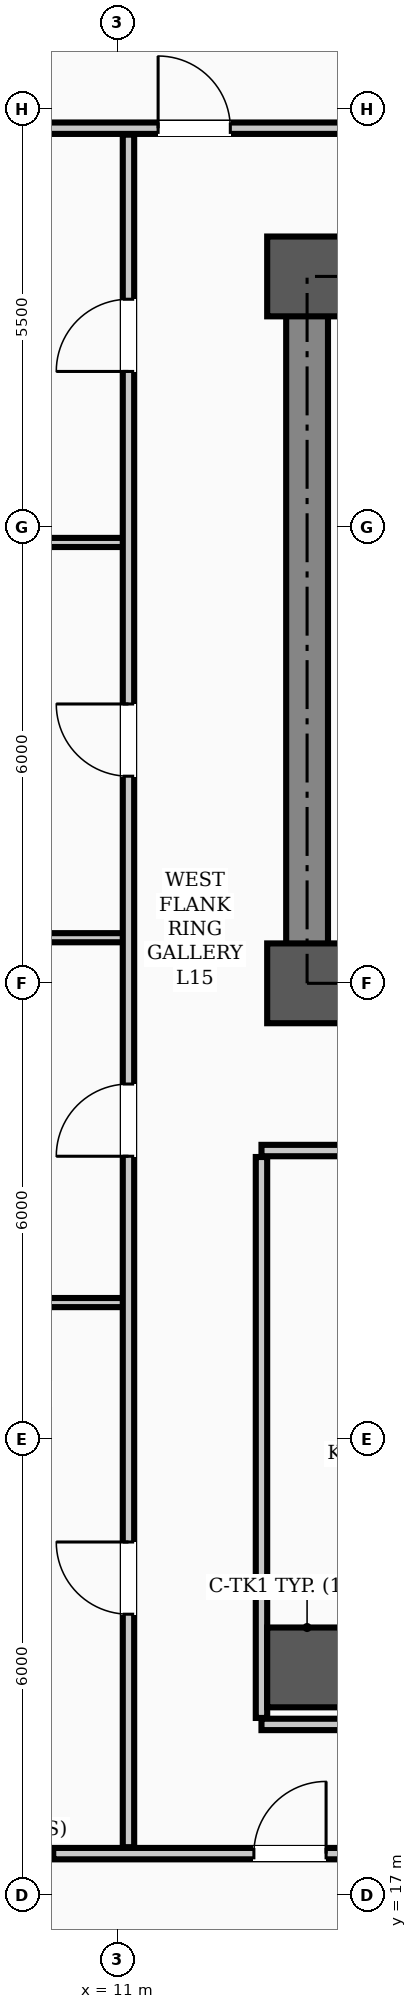
"""IFC4 building model, lengths in metres.
Left out: names, types, materials, properties, quantities, classifications, styles, units other than length and angle.
Written with IfcOpenShell. Run it as: python <this file> out.ifc"""

import sys

from ifc_helpers import new_model, si_unit, direction, frame, frame_2d, origin, origin_2d, place, context, subcontext, project, spatial, rectangle, hollow_rectangle, extrude, element, fill, save


model = new_model("IFC4")
c1 = context("Model", 3, precision=1e-05, world=origin(), true_north=direction((0.0, 1.0)))
c2 = subcontext(c1, "Body", "Model", "MODEL_VIEW")
j1 = project(units=[si_unit("LENGTHUNIT", "METRE"), si_unit("PLANEANGLEUNIT", "RADIAN")], contexts=[c1])
p1 = place(None, origin())
s1 = spatial("IfcSite", under=j1, at=p1, CompositionType="ELEMENT")
p2 = place(p1, origin())
s2 = spatial("IfcBuilding", under=s1, at=p2, CompositionType="ELEMENT")
p3 = place(p2, frame((0.0, 0.0, 61.6)))
s3 = spatial("IfcBuildingStorey", under=s2, at=p3, CompositionType="ELEMENT", Elevation=61.6)
for number, where, z_axis, x_axis in (
    (1, (13.5, 29.0, 0.0), (0.0, 0.0, 1.0), (1.0, 0.0, 0.0)),
    (2, (13.5, 38.3, 0.0), (0.0, 0.0, 1.0), (1.0, 0.0, 0.0)),
    (3, (13.5, 20.0, 0.0), (0.0, 0.0, 1.0), (1.0, 0.0, 0.0)),
):
    element("IfcColumn", number, at=place(p3, frame(where, z_axis=z_axis, x_axis=x_axis)), inside=s3, PredefinedType="COLUMN", context=c2, shape_type="SweptSolid", body=[
        extrude(hollow_rectangle(XDim=1.05, YDim=1.05, WallThickness=0.038, InnerFilletRadius=0.019, OuterFilletRadius=0.057, at=origin_2d()), origin(), (0.0, 0.0, 1.0), 3.9),
    ])
p4 = place(p3, frame((13.5, 29.0, 0.0), z_axis=(0.0, 0.0, 1.0), x_axis=(1.0, 0.0, 0.0)))
e4 = element("IfcWall", 4, at=p4, inside=s3, PredefinedType="SHEAR", context=c2, shape_type="SweptSolid", body=[
    extrude(rectangle(XDim=30.5, YDim=0.55, at=frame_2d((15.25, 0.0))), origin(), (0.0, 0.0, 1.0), 3.72),
])
p5 = place(p4, frame((1.75, 0.0, 0.0)))
e5 = element("IfcOpeningElement", 5, at=p5, cuts=e4, PredefinedType="OPENING", context=c2, shape_type="SweptSolid", body=[
    extrude(rectangle(XDim=1.1, YDim=2.08, at=frame_2d((0.55, 1.04))), frame((0.0, 0.285, 0.0), z_axis=(0.0, -1.0, 0.0), x_axis=(1.0, 0.0, 0.0)), (0.0, 0.0, 1.0), 0.57),
])
p6 = place(p4, frame((26.7, 0.0, 0.0)))
e6 = element("IfcOpeningElement", 6, at=p6, cuts=e4, PredefinedType="OPENING", context=c2, shape_type="SweptSolid", body=[
    extrude(rectangle(XDim=1.1, YDim=2.08, at=frame_2d((0.55, 1.04))), frame((0.0, 0.285, 0.0), z_axis=(0.0, -1.0, 0.0), x_axis=(1.0, 0.0, 0.0)), (0.0, 0.0, 1.0), 0.57),
])
p7 = place(p4, frame((6.8, 0.0, 0.0)))
e7 = element("IfcOpeningElement", 7, at=p7, cuts=e4, PredefinedType="OPENING", context=c2, shape_type="SweptSolid", body=[
    extrude(rectangle(XDim=1.1, YDim=2.08, at=frame_2d((0.55, 1.04))), frame((0.0, 0.285, 0.0), z_axis=(0.0, -1.0, 0.0), x_axis=(1.0, 0.0, 0.0)), (0.0, 0.0, 1.0), 0.57),
])
p8 = place(p4, frame((13.2, 0.0, 0.0)))
e8 = element("IfcOpeningElement", 8, at=p8, cuts=e4, PredefinedType="OPENING", context=c2, shape_type="SweptSolid", body=[
    extrude(rectangle(XDim=1.6, YDim=2.08, at=frame_2d((0.8, 1.04))), frame((0.0, 0.285, 0.0), z_axis=(0.0, -1.0, 0.0), x_axis=(1.0, 0.0, 0.0)), (0.0, 0.0, 1.0), 0.57),
])
p9 = place(p4, frame((19.6, 0.0, 0.0)))
e9 = element("IfcOpeningElement", 9, at=p9, cuts=e4, PredefinedType="OPENING", context=c2, shape_type="SweptSolid", body=[
    extrude(rectangle(XDim=0.9, YDim=2.08, at=frame_2d((0.45, 1.04))), frame((0.0, 0.285, 0.0), z_axis=(0.0, -1.0, 0.0), x_axis=(1.0, 0.0, 0.0)), (0.0, 0.0, 1.0), 0.57),
])
p10 = place(p4, frame((21.6, 0.0, 0.0)))
e10 = element("IfcOpeningElement", 10, at=p10, cuts=e4, PredefinedType="OPENING", context=c2, shape_type="SweptSolid", body=[
    extrude(rectangle(XDim=0.9, YDim=2.08, at=frame_2d((0.45, 1.04))), frame((0.0, 0.285, 0.0), z_axis=(0.0, -1.0, 0.0), x_axis=(1.0, 0.0, 0.0)), (0.0, 0.0, 1.0), 0.57),
])
p11 = place(p3, frame((13.5, 38.3, 0.0), z_axis=(0.0, 0.0, 1.0), x_axis=(1.0, 0.0, 0.0)))
e11 = element("IfcWall", 11, at=p11, inside=s3, PredefinedType="SHEAR", context=c2, shape_type="SweptSolid", body=[
    extrude(rectangle(XDim=30.5, YDim=0.55, at=frame_2d((15.25, 0.0))), origin(), (0.0, 0.0, 1.0), 3.72),
])
p12 = place(p3, frame((13.5, 29.35, 0.0), z_axis=(0.0, 0.0, 1.0), x_axis=(0.0, 1.0, 0.0)))
e12 = element("IfcWall", 12, at=p12, inside=s3, PredefinedType="SHEAR", context=c2, shape_type="SweptSolid", body=[
    extrude(rectangle(XDim=8.6, YDim=0.55, at=frame_2d((4.3, 0.0))), origin(), (0.0, 0.0, 1.0), 3.72),
])
p13 = place(p3, frame((12.9, 26.8, 0.0), z_axis=(0.0, 0.0, 1.0), x_axis=(1.0, 0.0, 0.0)))
e13 = element("IfcWall", 13, at=p13, inside=s3, PredefinedType="PARTITIONING", context=c2, shape_type="SweptSolid", body=[
    extrude(rectangle(XDim=31.7, YDim=0.15, at=frame_2d((15.85, 0.0))), origin(), (0.0, 0.0, 1.0), 3.1),
])
p14 = place(p13, frame((13.6, 0.0, 0.0)))
e14 = element("IfcOpeningElement", 14, at=p14, cuts=e13, PredefinedType="OPENING", context=c2, shape_type="SweptSolid", body=[
    extrude(rectangle(XDim=1.6, YDim=2.08, at=frame_2d((0.8, 1.04))), frame((0.0, 0.085, 0.0), z_axis=(0.0, -1.0, 0.0), x_axis=(1.0, 0.0, 0.0)), (0.0, 0.0, 1.0), 0.17),
])
p15 = place(p13, frame((2.475, 0.0, 0.0)))
e15 = element("IfcOpeningElement", 15, at=p15, cuts=e13, PredefinedType="OPENING", context=c2, shape_type="SweptSolid", body=[
    extrude(rectangle(XDim=0.95, YDim=2.08, at=frame_2d((0.475, 1.04))), frame((0.0, 0.085, 0.0), z_axis=(0.0, -1.0, 0.0), x_axis=(1.0, 0.0, 0.0)), (0.0, 0.0, 1.0), 0.17),
])
p16 = place(p13, frame((5.725, 0.0, 0.0)))
e16 = element("IfcOpeningElement", 16, at=p16, cuts=e13, PredefinedType="OPENING", context=c2, shape_type="SweptSolid", body=[
    extrude(rectangle(XDim=0.95, YDim=2.08, at=frame_2d((0.475, 1.04))), frame((0.0, 0.085, 0.0), z_axis=(0.0, -1.0, 0.0), x_axis=(1.0, 0.0, 0.0)), (0.0, 0.0, 1.0), 0.17),
])
p17 = place(p13, frame((8.875, 0.0, 0.0)))
e17 = element("IfcOpeningElement", 17, at=p17, cuts=e13, PredefinedType="OPENING", context=c2, shape_type="SweptSolid", body=[
    extrude(rectangle(XDim=0.95, YDim=2.08, at=frame_2d((0.475, 1.04))), frame((0.0, 0.085, 0.0), z_axis=(0.0, -1.0, 0.0), x_axis=(1.0, 0.0, 0.0)), (0.0, 0.0, 1.0), 0.17),
])
p18 = place(p13, frame((16.075, 0.0, 0.0)))
e18 = element("IfcOpeningElement", 18, at=p18, cuts=e13, PredefinedType="OPENING", context=c2, shape_type="SweptSolid", body=[
    extrude(rectangle(XDim=0.95, YDim=2.08, at=frame_2d((0.475, 1.04))), frame((0.0, 0.085, 0.0), z_axis=(0.0, -1.0, 0.0), x_axis=(1.0, 0.0, 0.0)), (0.0, 0.0, 1.0), 0.17),
])
p19 = place(p13, frame((22.525, 0.0, 0.0)))
e19 = element("IfcOpeningElement", 19, at=p19, cuts=e13, PredefinedType="OPENING", context=c2, shape_type="SweptSolid", body=[
    extrude(rectangle(XDim=0.95, YDim=2.08, at=frame_2d((0.475, 1.04))), frame((0.0, 0.085, 0.0), z_axis=(0.0, -1.0, 0.0), x_axis=(1.0, 0.0, 0.0)), (0.0, 0.0, 1.0), 0.17),
])
p20 = place(p13, frame((28.825, 0.0, 0.0)))
e20 = element("IfcOpeningElement", 20, at=p20, cuts=e13, PredefinedType="OPENING", context=c2, shape_type="SweptSolid", body=[
    extrude(rectangle(XDim=0.95, YDim=2.08, at=frame_2d((0.475, 1.04))), frame((0.0, 0.085, 0.0), z_axis=(0.0, -1.0, 0.0), x_axis=(1.0, 0.0, 0.0)), (0.0, 0.0, 1.0), 0.17),
])
p21 = place(p3, frame((10.16, 17.55, 0.0), z_axis=(0.0, 0.0, 1.0), x_axis=(1.0, 0.0, 0.0)))
e21 = element("IfcWall", 21, at=p21, inside=s3, PredefinedType="PARTITIONING", context=c2, shape_type="SweptSolid", body=[
    extrude(rectangle(XDim=44.68, YDim=0.15, at=frame_2d((22.34, 0.0))), origin(), (0.0, 0.0, 1.0), 3.1),
])
p22 = place(p21, frame((2.64, 0.0, 0.0)))
e22 = element("IfcOpeningElement", 22, at=p22, cuts=e21, PredefinedType="OPENING", context=c2, shape_type="SweptSolid", body=[
    extrude(rectangle(XDim=0.95, YDim=2.08, at=frame_2d((0.475, 1.04))), frame((0.0, 0.085, 0.0), z_axis=(0.0, -1.0, 0.0), x_axis=(1.0, 0.0, 0.0)), (0.0, 0.0, 1.0), 0.17),
])
p23 = place(p21, frame((8.965, 0.0, 0.0)))
e23 = element("IfcOpeningElement", 23, at=p23, cuts=e21, PredefinedType="OPENING", context=c2, shape_type="SweptSolid", body=[
    extrude(rectangle(XDim=0.95, YDim=2.08, at=frame_2d((0.475, 1.04))), frame((0.0, 0.085, 0.0), z_axis=(0.0, -1.0, 0.0), x_axis=(1.0, 0.0, 0.0)), (0.0, 0.0, 1.0), 0.17),
])
p24 = place(p21, frame((23.815, 0.0, 0.0)))
e24 = element("IfcOpeningElement", 24, at=p24, cuts=e21, PredefinedType="OPENING", context=c2, shape_type="SweptSolid", body=[
    extrude(rectangle(XDim=0.95, YDim=2.08, at=frame_2d((0.475, 1.04))), frame((0.0, 0.085, 0.0), z_axis=(0.0, -1.0, 0.0), x_axis=(1.0, 0.0, 0.0)), (0.0, 0.0, 1.0), 0.17),
])
p25 = place(p21, frame((33.44, 0.0, 0.0)))
e25 = element("IfcOpeningElement", 25, at=p25, cuts=e21, PredefinedType="OPENING", context=c2, shape_type="SweptSolid", body=[
    extrude(rectangle(XDim=0.95, YDim=2.08, at=frame_2d((0.475, 1.04))), frame((0.0, 0.085, 0.0), z_axis=(0.0, -1.0, 0.0), x_axis=(1.0, 0.0, 0.0)), (0.0, 0.0, 1.0), 0.17),
])
p26 = place(p3, frame((12.9, 19.25, 0.0), z_axis=(0.0, 0.0, 1.0), x_axis=(1.0, 0.0, 0.0)))
e26 = element("IfcWall", 26, at=p26, inside=s3, PredefinedType="PARTITIONING", context=c2, shape_type="SweptSolid", body=[
    extrude(rectangle(XDim=13.3, YDim=0.15, at=frame_2d((6.65, 0.0))), origin(), (0.0, 0.0, 1.0), 3.1),
])
p27 = place(p3, frame((7.81, 24.8, 0.0), z_axis=(0.0, 0.0, 1.0), x_axis=(1.0, 0.0, 0.0)))
e27 = element("IfcWall", 27, at=p27, inside=s3, PredefinedType="PARTITIONING", context=c2, shape_type="SweptSolid", body=[
    extrude(rectangle(XDim=3.34, YDim=0.12, at=frame_2d((1.67, 0.0))), origin(), (0.0, 0.0, 1.0), 3.212),
])
p28 = place(p3, frame((7.81, 29.6, 0.0), z_axis=(0.0, 0.0, 1.0), x_axis=(1.0, 0.0, 0.0)))
e28 = element("IfcWall", 28, at=p28, inside=s3, PredefinedType="PARTITIONING", context=c2, shape_type="SweptSolid", body=[
    extrude(rectangle(XDim=3.34, YDim=0.12, at=frame_2d((1.67, 0.0))), origin(), (0.0, 0.0, 1.0), 3.0),
])
p29 = place(p3, frame((7.81, 34.8, 0.0), z_axis=(0.0, 0.0, 1.0), x_axis=(1.0, 0.0, 0.0)))
e29 = element("IfcWall", 29, at=p29, inside=s3, PredefinedType="PARTITIONING", context=c2, shape_type="SweptSolid", body=[
    extrude(rectangle(XDim=3.34, YDim=0.12, at=frame_2d((1.67, 0.0))), origin(), (0.0, 0.0, 1.0), 3.212),
])
p30 = place(p3, frame((7.81, 40.25, 0.0), z_axis=(0.0, 0.0, 1.0), x_axis=(1.0, 0.0, 0.0)))
e30 = element("IfcWall", 30, at=p30, inside=s3, PredefinedType="PARTITIONING", context=c2, shape_type="SweptSolid", body=[
    extrude(rectangle(XDim=49.38, YDim=0.15, at=frame_2d((24.69, 0.0))), origin(), (0.0, 0.0, 1.0), 3.1),
])
p31 = place(p30, frame((3.73, 0.0, 0.0)))
e31 = element("IfcOpeningElement", 31, at=p31, cuts=e30, PredefinedType="OPENING", context=c2, shape_type="SweptSolid", body=[
    extrude(rectangle(XDim=0.95, YDim=2.08, at=frame_2d((0.475, 1.04))), frame((0.0, 0.085, 0.0), z_axis=(0.0, -1.0, 0.0), x_axis=(1.0, 0.0, 0.0)), (0.0, 0.0, 1.0), 0.17),
])
p32 = place(p30, frame((13.815, 0.0, 0.0)))
e32 = element("IfcOpeningElement", 32, at=p32, cuts=e30, PredefinedType="OPENING", context=c2, shape_type="SweptSolid", body=[
    extrude(rectangle(XDim=0.95, YDim=2.08, at=frame_2d((0.475, 1.04))), frame((0.0, 0.085, 0.0), z_axis=(0.0, -1.0, 0.0), x_axis=(1.0, 0.0, 0.0)), (0.0, 0.0, 1.0), 0.17),
])
p33 = place(p30, frame((19.965, 0.0, 0.0)))
e33 = element("IfcOpeningElement", 33, at=p33, cuts=e30, PredefinedType="OPENING", context=c2, shape_type="SweptSolid", body=[
    extrude(rectangle(XDim=0.95, YDim=2.08, at=frame_2d((0.475, 1.04))), frame((0.0, 0.085, 0.0), z_axis=(0.0, -1.0, 0.0), x_axis=(1.0, 0.0, 0.0)), (0.0, 0.0, 1.0), 0.17),
])
p34 = place(p30, frame((30.815, 0.0, 0.0)))
e34 = element("IfcOpeningElement", 34, at=p34, cuts=e30, PredefinedType="OPENING", context=c2, shape_type="SweptSolid", body=[
    extrude(rectangle(XDim=0.95, YDim=2.08, at=frame_2d((0.475, 1.04))), frame((0.0, 0.085, 0.0), z_axis=(0.0, -1.0, 0.0), x_axis=(1.0, 0.0, 0.0)), (0.0, 0.0, 1.0), 0.17),
])
p35 = place(p30, frame((37.2, 0.0, 0.0)))
e35 = element("IfcOpeningElement", 35, at=p35, cuts=e30, PredefinedType="OPENING", context=c2, shape_type="SweptSolid", body=[
    extrude(rectangle(XDim=0.95, YDim=2.08, at=frame_2d((0.475, 1.04))), frame((0.0, 0.085, 0.0), z_axis=(0.0, -1.0, 0.0), x_axis=(1.0, 0.0, 0.0)), (0.0, 0.0, 1.0), 0.17),
])
p36 = place(p3, frame((11.15, 17.635, 0.0), z_axis=(0.0, 0.0, 1.0), x_axis=(0.0, 1.0, 0.0)))
e36 = element("IfcWall", 36, at=p36, inside=s3, PredefinedType="PARTITIONING", context=c2, shape_type="SweptSolid", body=[
    extrude(rectangle(XDim=22.53, YDim=0.15, at=frame_2d((11.265, 0.0))), origin(), (0.0, 0.0, 1.0), 3.0),
])
p37 = place(p36, frame((3.065, 0.0, 0.0)))
e37 = element("IfcOpeningElement", 37, at=p37, cuts=e36, PredefinedType="OPENING", context=c2, shape_type="SweptSolid", body=[
    extrude(rectangle(XDim=0.95, YDim=2.08, at=frame_2d((0.475, 1.04))), frame((0.0, 0.085, 0.0), z_axis=(0.0, -1.0, 0.0), x_axis=(1.0, 0.0, 0.0)), (0.0, 0.0, 1.0), 0.17),
])
p38 = place(p36, frame((9.09, 0.0, 0.0)))
e38 = element("IfcOpeningElement", 38, at=p38, cuts=e36, PredefinedType="OPENING", context=c2, shape_type="SweptSolid", body=[
    extrude(rectangle(XDim=0.95, YDim=2.08, at=frame_2d((0.475, 1.04))), frame((0.0, 0.085, 0.0), z_axis=(0.0, -1.0, 0.0), x_axis=(1.0, 0.0, 0.0)), (0.0, 0.0, 1.0), 0.17),
])
p39 = place(p36, frame((14.09, 0.0, 0.0)))
e39 = element("IfcOpeningElement", 39, at=p39, cuts=e36, PredefinedType="OPENING", context=c2, shape_type="SweptSolid", body=[
    extrude(rectangle(XDim=0.95, YDim=2.08, at=frame_2d((0.475, 1.04))), frame((0.0, 0.085, 0.0), z_axis=(0.0, -1.0, 0.0), x_axis=(1.0, 0.0, 0.0)), (0.0, 0.0, 1.0), 0.17),
])
p40 = place(p36, frame((19.415, 0.0, 0.0)))
e40 = element("IfcOpeningElement", 40, at=p40, cuts=e36, PredefinedType="OPENING", context=c2, shape_type="SweptSolid", body=[
    extrude(rectangle(XDim=0.95, YDim=2.08, at=frame_2d((0.475, 1.04))), frame((0.0, 0.085, 0.0), z_axis=(0.0, -1.0, 0.0), x_axis=(1.0, 0.0, 0.0)), (0.0, 0.0, 1.0), 0.17),
])
p41 = place(p3, frame((12.9, 19.335, 0.0), z_axis=(0.0, 0.0, 1.0), x_axis=(0.0, 1.0, 0.0)))
e41 = element("IfcWall", 41, at=p41, inside=s3, PredefinedType="PARTITIONING", context=c2, shape_type="SweptSolid", body=[
    extrude(rectangle(XDim=7.38, YDim=0.15, at=frame_2d((3.69, 0.0))), origin(), (0.0, 0.0, 1.0), 3.0),
])
p42 = place(p22, origin())
e42 = element("IfcDoor", 42, at=p42, inside=s3, OperationType="SINGLE_SWING_RIGHT", PredefinedType="DOOR", context=c2, shape_type="SweptSolid", body=[
    extrude(rectangle(XDim=0.95, YDim=2.08, at=frame_2d((0.475, 1.04))), frame((0.0, 0.025, 0.0), z_axis=(0.0, -1.0, 0.0), x_axis=(1.0, 0.0, 0.0)), (0.0, 0.0, 1.0), 0.05),
])
fill(e22, e42)
p43 = place(p37, origin())
e43 = element("IfcDoor", 43, at=p43, inside=s3, OperationType="SINGLE_SWING_RIGHT", PredefinedType="DOOR", context=c2, shape_type="SweptSolid", body=[
    extrude(rectangle(XDim=0.95, YDim=2.08, at=frame_2d((0.475, 1.04))), frame((0.0, 0.025, 0.0), z_axis=(0.0, -1.0, 0.0), x_axis=(1.0, 0.0, 0.0)), (0.0, 0.0, 1.0), 0.05),
])
fill(e37, e43)
p44 = place(p38, origin())
e44 = element("IfcDoor", 44, at=p44, inside=s3, OperationType="SINGLE_SWING_LEFT", PredefinedType="DOOR", context=c2, shape_type="SweptSolid", body=[
    extrude(rectangle(XDim=0.95, YDim=2.08, at=frame_2d((0.475, 1.04))), frame((0.0, 0.025, 0.0), z_axis=(0.0, -1.0, 0.0), x_axis=(1.0, 0.0, 0.0)), (0.0, 0.0, 1.0), 0.05),
])
fill(e38, e44)
p45 = place(p39, origin())
e45 = element("IfcDoor", 45, at=p45, inside=s3, OperationType="SINGLE_SWING_RIGHT", PredefinedType="DOOR", context=c2, shape_type="SweptSolid", body=[
    extrude(rectangle(XDim=0.95, YDim=2.08, at=frame_2d((0.475, 1.04))), frame((0.0, 0.025, 0.0), z_axis=(0.0, -1.0, 0.0), x_axis=(1.0, 0.0, 0.0)), (0.0, 0.0, 1.0), 0.05),
])
fill(e39, e45)
p46 = place(p40, origin())
e46 = element("IfcDoor", 46, at=p46, inside=s3, OperationType="SINGLE_SWING_LEFT", PredefinedType="DOOR", context=c2, shape_type="SweptSolid", body=[
    extrude(rectangle(XDim=0.95, YDim=2.08, at=frame_2d((0.475, 1.04))), frame((0.0, 0.025, 0.0), z_axis=(0.0, -1.0, 0.0), x_axis=(1.0, 0.0, 0.0)), (0.0, 0.0, 1.0), 0.05),
])
fill(e40, e46)
p47 = place(p31, origin())
e47 = element("IfcDoor", 47, at=p47, inside=s3, OperationType="SINGLE_SWING_LEFT", PredefinedType="DOOR", context=c2, shape_type="SweptSolid", body=[
    extrude(rectangle(XDim=0.95, YDim=2.08, at=frame_2d((0.475, 1.04))), frame((0.0, 0.025, 0.0), z_axis=(0.0, -1.0, 0.0), x_axis=(1.0, 0.0, 0.0)), (0.0, 0.0, 1.0), 0.05),
])
fill(e31, e47)
save(model, sys.argv[1])
